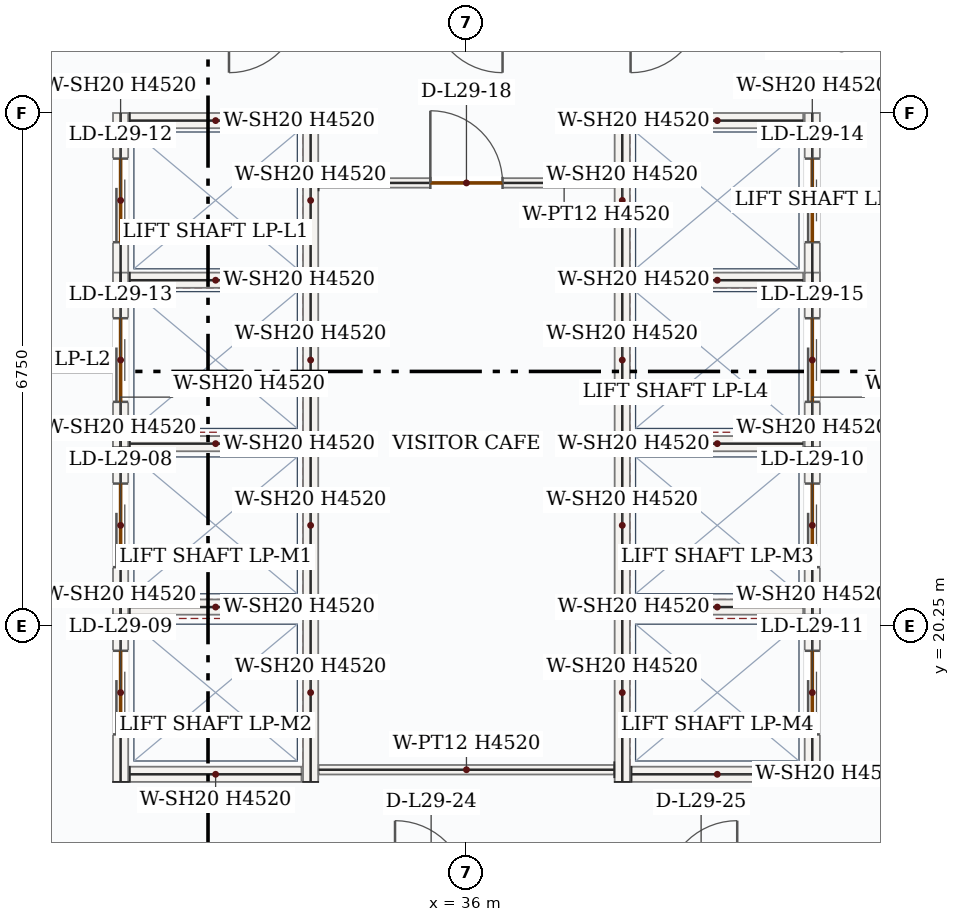
"""IFC4 building model, lengths in metres.
Left out: names, types, materials, properties, quantities, classifications, styles, units other than length and angle.
Written with IfcOpenShell. Run it as: python <this file> out.ifc"""

import sys

from ifc_helpers import new_model, si_unit, direction, frame, frame_2d, origin, place, context, subcontext, project, spatial, rectangle, extrude, source, transform, mapped, element, fill, save


model = new_model("IFC4")
c1 = context("Model", 3, precision=1e-05, world=origin(), true_north=direction((0.0, 1.0)))
c2 = subcontext(c1, "Body", "Model", "MODEL_VIEW")
j1 = project(units=[si_unit("LENGTHUNIT", "METRE"), si_unit("PLANEANGLEUNIT", "RADIAN")], contexts=[c1])
p1 = place(None, origin())
s1 = spatial("IfcSite", under=j1, at=p1, CompositionType="ELEMENT")
p2 = place(p1, origin())
s2 = spatial("IfcBuilding", under=s1, at=p2, CompositionType="ELEMENT")
p3 = place(p2, frame((0.0, 0.0, 130.8)))
s3 = spatial("IfcBuildingStorey", under=s2, at=p3, CompositionType="ELEMENT", Elevation=130.8)
p4 = place(p3, frame((31.45, 20.4, 0.0), z_axis=(0.0, 0.0, 1.0), x_axis=(0.0, 1.0, 0.0)))
e1 = element("IfcWall", 1, at=p4, inside=s3, PredefinedType="SOLIDWALL", context=c2, shape_type="SweptSolid", body=[
    extrude(rectangle(XDim=2.35, YDim=0.2, at=frame_2d((1.175, 0.0))), origin(), (0.0, 0.0, 1.0), 4.52),
])
p5 = place(p4, frame((0.625, 0.0, 0.0)))
e2 = element("IfcOpeningElement", 2, at=p5, cuts=e1, PredefinedType="OPENING", context=c2, shape_type="SweptSolid", body=[
    extrude(rectangle(XDim=1.1, YDim=2.15, at=frame_2d((0.55, 1.075))), frame((0.0, 0.11, 0.0), z_axis=(0.0, -1.0, 0.0), x_axis=(1.0, 0.0, 0.0)), (0.0, 0.0, 1.0), 0.22),
])
m1 = source(origin(), c2, "Body", "SweptSolid", [
    extrude(rectangle(XDim=2.35, YDim=0.2, at=frame_2d((1.175, 0.0))), origin(), (0.0, 0.0, 1.0), 4.52),
])
p6 = place(p3, frame((33.95, 20.4, 0.0), z_axis=(0.0, 0.0, 1.0), x_axis=(0.0, 1.0, 0.0)))
e3 = element("IfcWall", 3, at=p6, inside=s3, PredefinedType="SOLIDWALL", context=c2, shape_type="MappedRepresentation", body=[
    mapped(m1, transform((0.0, 0.0, 0.0), x_axis=(1.0, 0.0, 0.0), y_axis=(0.0, 1.0, 0.0), z_axis=(0.0, 0.0, 1.0), scale=1.0)),
])
m2 = source(origin(), c2, "Body", "SweptSolid", [
    extrude(rectangle(XDim=2.26, YDim=0.2, at=frame_2d((1.13, 0.0))), origin(), (0.0, 0.0, 1.0), 4.52),
])
for number, where, z_axis, x_axis in (
    (4, (31.57, 20.5, 0.0), (0.0, 0.0, 1.0), (1.0, 0.0, 0.0)),
    (5, (31.57, 22.65, 0.0), (0.0, 0.0, 1.0), (1.0, 0.0, 0.0)),
):
    element("IfcWall", number, at=place(p3, frame(where, z_axis=z_axis, x_axis=x_axis)), inside=s3, PredefinedType="SOLIDWALL", context=c2, shape_type="MappedRepresentation", body=[
        mapped(m2, transform((0.0, 0.0, 0.0), x_axis=(1.0, 0.0, 0.0), y_axis=(0.0, 1.0, 0.0), z_axis=(0.0, 0.0, 1.0), scale=1.0)),
    ])
p7 = place(p3, frame((31.45, 18.2, 0.0), z_axis=(0.0, 0.0, 1.0), x_axis=(0.0, 1.0, 0.0)))
e6 = element("IfcWall", 6, at=p7, inside=s3, PredefinedType="SOLIDWALL", context=c2, shape_type="SweptSolid", body=[
    extrude(rectangle(XDim=2.35, YDim=0.2, at=frame_2d((1.175, 0.0))), origin(), (0.0, 0.0, 1.0), 4.52),
])
p8 = place(p7, frame((0.625, 0.0, 0.0)))
e7 = element("IfcOpeningElement", 7, at=p8, cuts=e6, PredefinedType="OPENING", context=c2, shape_type="SweptSolid", body=[
    extrude(rectangle(XDim=1.1, YDim=2.15, at=frame_2d((0.55, 1.075))), frame((0.0, 0.11, 0.0), z_axis=(0.0, -1.0, 0.0), x_axis=(1.0, 0.0, 0.0)), (0.0, 0.0, 1.0), 0.22),
])
p9 = place(p3, frame((33.95, 18.2, 0.0), z_axis=(0.0, 0.0, 1.0), x_axis=(0.0, 1.0, 0.0)))
e8 = element("IfcWall", 8, at=p9, inside=s3, PredefinedType="SOLIDWALL", context=c2, shape_type="MappedRepresentation", body=[
    mapped(m1, transform((0.0, 0.0, 0.0), x_axis=(1.0, 0.0, 0.0), y_axis=(0.0, 1.0, 0.0), z_axis=(0.0, 0.0, 1.0), scale=1.0)),
])
p10 = place(p3, frame((31.57, 18.3, 0.0), z_axis=(0.0, 0.0, 1.0), x_axis=(1.0, 0.0, 0.0)))
e9 = element("IfcWall", 9, at=p10, inside=s3, PredefinedType="SOLIDWALL", context=c2, shape_type="MappedRepresentation", body=[
    mapped(m2, transform((0.0, 0.0, 0.0), x_axis=(1.0, 0.0, 0.0), y_axis=(0.0, 1.0, 0.0), z_axis=(0.0, 0.0, 1.0), scale=1.0)),
])
p11 = place(p3, frame((38.05, 20.4, 0.0), z_axis=(0.0, 0.0, 1.0), x_axis=(0.0, 1.0, 0.0)))
e10 = element("IfcWall", 10, at=p11, inside=s3, PredefinedType="SOLIDWALL", context=c2, shape_type="MappedRepresentation", body=[
    mapped(m1, transform((0.0, 0.0, 0.0), x_axis=(1.0, 0.0, 0.0), y_axis=(0.0, 1.0, 0.0), z_axis=(0.0, 0.0, 1.0), scale=1.0)),
])
p12 = place(p3, frame((40.55, 20.4, 0.0), z_axis=(0.0, 0.0, 1.0), x_axis=(0.0, 1.0, 0.0)))
e11 = element("IfcWall", 11, at=p12, inside=s3, PredefinedType="SOLIDWALL", context=c2, shape_type="SweptSolid", body=[
    extrude(rectangle(XDim=2.35, YDim=0.2, at=frame_2d((1.175, 0.0))), origin(), (0.0, 0.0, 1.0), 4.52),
])
p13 = place(p12, frame((0.625, 0.0, 0.0)))
e12 = element("IfcOpeningElement", 12, at=p13, cuts=e11, PredefinedType="OPENING", context=c2, shape_type="SweptSolid", body=[
    extrude(rectangle(XDim=1.1, YDim=2.15, at=frame_2d((0.55, 1.075))), frame((0.0, 0.11, 0.0), z_axis=(0.0, -1.0, 0.0), x_axis=(1.0, 0.0, 0.0)), (0.0, 0.0, 1.0), 0.22),
])
for number, where, z_axis, x_axis in (
    (13, (38.17, 20.5, 0.0), (0.0, 0.0, 1.0), (1.0, 0.0, 0.0)),
    (14, (38.17, 22.65, 0.0), (0.0, 0.0, 1.0), (1.0, 0.0, 0.0)),
):
    element("IfcWall", number, at=place(p3, frame(where, z_axis=z_axis, x_axis=x_axis)), inside=s3, PredefinedType="SOLIDWALL", context=c2, shape_type="MappedRepresentation", body=[
        mapped(m2, transform((0.0, 0.0, 0.0), x_axis=(1.0, 0.0, 0.0), y_axis=(0.0, 1.0, 0.0), z_axis=(0.0, 0.0, 1.0), scale=1.0)),
    ])
p14 = place(p3, frame((38.05, 18.2, 0.0), z_axis=(0.0, 0.0, 1.0), x_axis=(0.0, 1.0, 0.0)))
e15 = element("IfcWall", 15, at=p14, inside=s3, PredefinedType="SOLIDWALL", context=c2, shape_type="MappedRepresentation", body=[
    mapped(m1, transform((0.0, 0.0, 0.0), x_axis=(1.0, 0.0, 0.0), y_axis=(0.0, 1.0, 0.0), z_axis=(0.0, 0.0, 1.0), scale=1.0)),
])
p15 = place(p3, frame((40.55, 18.2, 0.0), z_axis=(0.0, 0.0, 1.0), x_axis=(0.0, 1.0, 0.0)))
e16 = element("IfcWall", 16, at=p15, inside=s3, PredefinedType="SOLIDWALL", context=c2, shape_type="SweptSolid", body=[
    extrude(rectangle(XDim=2.35, YDim=0.2, at=frame_2d((1.175, 0.0))), origin(), (0.0, 0.0, 1.0), 4.52),
])
p16 = place(p15, frame((0.625, 0.0, 0.0)))
e17 = element("IfcOpeningElement", 17, at=p16, cuts=e16, PredefinedType="OPENING", context=c2, shape_type="SweptSolid", body=[
    extrude(rectangle(XDim=1.1, YDim=2.15, at=frame_2d((0.55, 1.075))), frame((0.0, 0.11, 0.0), z_axis=(0.0, -1.0, 0.0), x_axis=(1.0, 0.0, 0.0)), (0.0, 0.0, 1.0), 0.22),
])
p17 = place(p3, frame((38.17, 18.3, 0.0), z_axis=(0.0, 0.0, 1.0), x_axis=(1.0, 0.0, 0.0)))
e18 = element("IfcWall", 18, at=p17, inside=s3, PredefinedType="SOLIDWALL", context=c2, shape_type="MappedRepresentation", body=[
    mapped(m2, transform((0.0, 0.0, 0.0), x_axis=(1.0, 0.0, 0.0), y_axis=(0.0, 1.0, 0.0), z_axis=(0.0, 0.0, 1.0), scale=1.0)),
])
p18 = place(p3, frame((31.45, 24.7, 0.0), z_axis=(0.0, 0.0, 1.0), x_axis=(0.0, 1.0, 0.0)))
e19 = element("IfcWall", 19, at=p18, inside=s3, PredefinedType="SOLIDWALL", context=c2, shape_type="SweptSolid", body=[
    extrude(rectangle(XDim=2.3, YDim=0.2, at=frame_2d((1.15, 0.0))), origin(), (0.0, 0.0, 1.0), 4.52),
])
p19 = place(p18, frame((0.6, 0.0, 0.0)))
e20 = element("IfcOpeningElement", 20, at=p19, cuts=e19, PredefinedType="OPENING", context=c2, shape_type="SweptSolid", body=[
    extrude(rectangle(XDim=1.1, YDim=2.15, at=frame_2d((0.55, 1.075))), frame((0.0, 0.11, 0.0), z_axis=(0.0, -1.0, 0.0), x_axis=(1.0, 0.0, 0.0)), (0.0, 0.0, 1.0), 0.22),
])
m3 = source(origin(), c2, "Body", "SweptSolid", [
    extrude(rectangle(XDim=2.3, YDim=0.2, at=frame_2d((1.15, 0.0))), origin(), (0.0, 0.0, 1.0), 4.52),
])
p20 = place(p3, frame((33.95, 24.7, 0.0), z_axis=(0.0, 0.0, 1.0), x_axis=(0.0, 1.0, 0.0)))
e21 = element("IfcWall", 21, at=p20, inside=s3, PredefinedType="SOLIDWALL", context=c2, shape_type="MappedRepresentation", body=[
    mapped(m3, transform((0.0, 0.0, 0.0), x_axis=(1.0, 0.0, 0.0), y_axis=(0.0, 1.0, 0.0), z_axis=(0.0, 0.0, 1.0), scale=1.0)),
])
for number, where, z_axis, x_axis in (
    (22, (31.57, 24.8, 0.0), (0.0, 0.0, 1.0), (1.0, 0.0, 0.0)),
    (23, (31.57, 26.9, 0.0), (0.0, 0.0, 1.0), (1.0, 0.0, 0.0)),
):
    element("IfcWall", number, at=place(p3, frame(where, z_axis=z_axis, x_axis=x_axis)), inside=s3, PredefinedType="SOLIDWALL", context=c2, shape_type="MappedRepresentation", body=[
        mapped(m2, transform((0.0, 0.0, 0.0), x_axis=(1.0, 0.0, 0.0), y_axis=(0.0, 1.0, 0.0), z_axis=(0.0, 0.0, 1.0), scale=1.0)),
    ])
p21 = place(p3, frame((31.45, 22.6, 0.0), z_axis=(0.0, 0.0, 1.0), x_axis=(0.0, 1.0, 0.0)))
e24 = element("IfcWall", 24, at=p21, inside=s3, PredefinedType="SOLIDWALL", context=c2, shape_type="SweptSolid", body=[
    extrude(rectangle(XDim=2.3, YDim=0.2, at=frame_2d((1.15, 0.0))), origin(), (0.0, 0.0, 1.0), 4.52),
])
p22 = place(p21, frame((0.6, 0.0, 0.0)))
e25 = element("IfcOpeningElement", 25, at=p22, cuts=e24, PredefinedType="OPENING", context=c2, shape_type="SweptSolid", body=[
    extrude(rectangle(XDim=1.1, YDim=2.15, at=frame_2d((0.55, 1.075))), frame((0.0, 0.11, 0.0), z_axis=(0.0, -1.0, 0.0), x_axis=(1.0, 0.0, 0.0)), (0.0, 0.0, 1.0), 0.22),
])
m4 = source(origin(), c2, "Body", "SweptSolid", [
    extrude(rectangle(XDim=2.3, YDim=0.2, at=frame_2d((1.15, 0.0))), origin(), (0.0, 0.0, 1.0), 4.52),
])
p23 = place(p3, frame((33.95, 22.6, 0.0), z_axis=(0.0, 0.0, 1.0), x_axis=(0.0, 1.0, 0.0)))
e26 = element("IfcWall", 26, at=p23, inside=s3, PredefinedType="SOLIDWALL", context=c2, shape_type="MappedRepresentation", body=[
    mapped(m4, transform((0.0, 0.0, 0.0), x_axis=(1.0, 0.0, 0.0), y_axis=(0.0, 1.0, 0.0), z_axis=(0.0, 0.0, 1.0), scale=1.0)),
])
p24 = place(p3, frame((38.05, 24.7, 0.0), z_axis=(0.0, 0.0, 1.0), x_axis=(0.0, 1.0, 0.0)))
e27 = element("IfcWall", 27, at=p24, inside=s3, PredefinedType="SOLIDWALL", context=c2, shape_type="MappedRepresentation", body=[
    mapped(m3, transform((0.0, 0.0, 0.0), x_axis=(1.0, 0.0, 0.0), y_axis=(0.0, 1.0, 0.0), z_axis=(0.0, 0.0, 1.0), scale=1.0)),
])
p25 = place(p3, frame((40.55, 24.7, 0.0), z_axis=(0.0, 0.0, 1.0), x_axis=(0.0, 1.0, 0.0)))
e28 = element("IfcWall", 28, at=p25, inside=s3, PredefinedType="SOLIDWALL", context=c2, shape_type="SweptSolid", body=[
    extrude(rectangle(XDim=2.3, YDim=0.2, at=frame_2d((1.15, 0.0))), origin(), (0.0, 0.0, 1.0), 4.52),
])
p26 = place(p25, frame((0.6, 0.0, 0.0)))
e29 = element("IfcOpeningElement", 29, at=p26, cuts=e28, PredefinedType="OPENING", context=c2, shape_type="SweptSolid", body=[
    extrude(rectangle(XDim=1.1, YDim=2.15, at=frame_2d((0.55, 1.075))), frame((0.0, 0.11, 0.0), z_axis=(0.0, -1.0, 0.0), x_axis=(1.0, 0.0, 0.0)), (0.0, 0.0, 1.0), 0.22),
])
for number, where, z_axis, x_axis in (
    (30, (38.17, 24.8, 0.0), (0.0, 0.0, 1.0), (1.0, 0.0, 0.0)),
    (31, (38.17, 26.9, 0.0), (0.0, 0.0, 1.0), (1.0, 0.0, 0.0)),
):
    element("IfcWall", number, at=place(p3, frame(where, z_axis=z_axis, x_axis=x_axis)), inside=s3, PredefinedType="SOLIDWALL", context=c2, shape_type="MappedRepresentation", body=[
        mapped(m2, transform((0.0, 0.0, 0.0), x_axis=(1.0, 0.0, 0.0), y_axis=(0.0, 1.0, 0.0), z_axis=(0.0, 0.0, 1.0), scale=1.0)),
    ])
p27 = place(p3, frame((38.05, 22.6, 0.0), z_axis=(0.0, 0.0, 1.0), x_axis=(0.0, 1.0, 0.0)))
e32 = element("IfcWall", 32, at=p27, inside=s3, PredefinedType="SOLIDWALL", context=c2, shape_type="MappedRepresentation", body=[
    mapped(m4, transform((0.0, 0.0, 0.0), x_axis=(1.0, 0.0, 0.0), y_axis=(0.0, 1.0, 0.0), z_axis=(0.0, 0.0, 1.0), scale=1.0)),
])
p28 = place(p3, frame((40.55, 22.6, 0.0), z_axis=(0.0, 0.0, 1.0), x_axis=(0.0, 1.0, 0.0)))
e33 = element("IfcWall", 33, at=p28, inside=s3, PredefinedType="SOLIDWALL", context=c2, shape_type="SweptSolid", body=[
    extrude(rectangle(XDim=2.3, YDim=0.2, at=frame_2d((1.15, 0.0))), origin(), (0.0, 0.0, 1.0), 4.52),
])
p29 = place(p28, frame((0.6, 0.0, 0.0)))
e34 = element("IfcOpeningElement", 34, at=p29, cuts=e33, PredefinedType="OPENING", context=c2, shape_type="SweptSolid", body=[
    extrude(rectangle(XDim=1.1, YDim=2.15, at=frame_2d((0.55, 1.075))), frame((0.0, 0.11, 0.0), z_axis=(0.0, -1.0, 0.0), x_axis=(1.0, 0.0, 0.0)), (0.0, 0.0, 1.0), 0.22),
])
m5 = source(origin(), c2, "Body", "SweptSolid", [
    extrude(rectangle(XDim=3.89, YDim=0.125, at=frame_2d((1.945, 0.0))), origin(), (0.0, 0.0, 1.0), 4.52),
])
p30 = place(p3, frame((37.945, 18.36, 0.0), z_axis=(0.0, 0.0, 1.0), x_axis=(-1.0, 0.0, 0.0)))
e35 = element("IfcWall", 35, at=p30, inside=s3, PredefinedType="PARTITIONING", context=c2, shape_type="MappedRepresentation", body=[
    mapped(m5, transform((0.0, 0.0, 0.0), x_axis=(1.0, 0.0, 0.0), y_axis=(0.0, 1.0, 0.0), z_axis=(0.0, 0.0, 1.0), scale=1.0)),
])
p31 = place(p3, frame((34.055, 26.08, 0.0), z_axis=(0.0, 0.0, 1.0), x_axis=(1.0, 0.0, 0.0)))
e36 = element("IfcWall", 36, at=p31, inside=s3, PredefinedType="PARTITIONING", context=c2, shape_type="SweptSolid", body=[
    extrude(rectangle(XDim=3.89, YDim=0.125, at=frame_2d((1.945, 0.0))), origin(), (0.0, 0.0, 1.0), 4.52),
])
p32 = place(p31, frame((1.47, 0.0, 0.0)))
e37 = element("IfcOpeningElement", 37, at=p32, cuts=e36, PredefinedType="OPENING", context=c2, shape_type="SweptSolid", body=[
    extrude(rectangle(XDim=0.95, YDim=2.15, at=frame_2d((0.475, 1.075))), frame((0.0, 0.073, 0.0), z_axis=(0.0, -1.0, 0.0), x_axis=(1.0, 0.0, 0.0)), (0.0, 0.0, 1.0), 0.145),
])
m6 = source(origin(), c2, "Body", "SweptSolid", [
    extrude(rectangle(XDim=1.1, YDim=2.15, at=frame_2d((0.55, 1.075))), frame((0.0, 0.025, 0.0), z_axis=(0.0, -1.0, 0.0), x_axis=(1.0, 0.0, 0.0)), (0.0, 0.0, 1.0), 0.05),
])
p33 = place(p5, origin())
e38 = element("IfcDoor", 38, at=p33, inside=s3, OperationType="DOUBLE_DOOR_SLIDING", PredefinedType="DOOR", context=c2, shape_type="MappedRepresentation", body=[
    mapped(m6, transform((0.0, 0.0, 0.0), x_axis=(1.0, 0.0, 0.0), y_axis=(0.0, 1.0, 0.0), z_axis=(0.0, 0.0, 1.0), scale=1.0)),
])
fill(e2, e38)
p34 = place(p8, origin())
e39 = element("IfcDoor", 39, at=p34, inside=s3, OperationType="DOUBLE_DOOR_SLIDING", PredefinedType="DOOR", context=c2, shape_type="MappedRepresentation", body=[
    mapped(m6, transform((0.0, 0.0, 0.0), x_axis=(1.0, 0.0, 0.0), y_axis=(0.0, 1.0, 0.0), z_axis=(0.0, 0.0, 1.0), scale=1.0)),
])
fill(e7, e39)
p35 = place(p13, origin())
e40 = element("IfcDoor", 40, at=p35, inside=s3, OperationType="DOUBLE_DOOR_SLIDING", PredefinedType="DOOR", context=c2, shape_type="MappedRepresentation", body=[
    mapped(m6, transform((0.0, 0.0, 0.0), x_axis=(1.0, 0.0, 0.0), y_axis=(0.0, 1.0, 0.0), z_axis=(0.0, 0.0, 1.0), scale=1.0)),
])
fill(e12, e40)
p36 = place(p16, origin())
e41 = element("IfcDoor", 41, at=p36, inside=s3, OperationType="DOUBLE_DOOR_SLIDING", PredefinedType="DOOR", context=c2, shape_type="MappedRepresentation", body=[
    mapped(m6, transform((0.0, 0.0, 0.0), x_axis=(1.0, 0.0, 0.0), y_axis=(0.0, 1.0, 0.0), z_axis=(0.0, 0.0, 1.0), scale=1.0)),
])
fill(e17, e41)
p37 = place(p19, origin())
e42 = element("IfcDoor", 42, at=p37, inside=s3, OperationType="DOUBLE_DOOR_SLIDING", PredefinedType="DOOR", context=c2, shape_type="MappedRepresentation", body=[
    mapped(m6, transform((0.0, 0.0, 0.0), x_axis=(1.0, 0.0, 0.0), y_axis=(0.0, 1.0, 0.0), z_axis=(0.0, 0.0, 1.0), scale=1.0)),
])
fill(e20, e42)
p38 = place(p22, origin())
e43 = element("IfcDoor", 43, at=p38, inside=s3, OperationType="DOUBLE_DOOR_SLIDING", PredefinedType="DOOR", context=c2, shape_type="MappedRepresentation", body=[
    mapped(m6, transform((0.0, 0.0, 0.0), x_axis=(1.0, 0.0, 0.0), y_axis=(0.0, 1.0, 0.0), z_axis=(0.0, 0.0, 1.0), scale=1.0)),
])
fill(e25, e43)
p39 = place(p26, origin())
e44 = element("IfcDoor", 44, at=p39, inside=s3, OperationType="DOUBLE_DOOR_SLIDING", PredefinedType="DOOR", context=c2, shape_type="MappedRepresentation", body=[
    mapped(m6, transform((0.0, 0.0, 0.0), x_axis=(1.0, 0.0, 0.0), y_axis=(0.0, 1.0, 0.0), z_axis=(0.0, 0.0, 1.0), scale=1.0)),
])
fill(e29, e44)
p40 = place(p29, origin())
e45 = element("IfcDoor", 45, at=p40, inside=s3, OperationType="DOUBLE_DOOR_SLIDING", PredefinedType="DOOR", context=c2, shape_type="MappedRepresentation", body=[
    mapped(m6, transform((0.0, 0.0, 0.0), x_axis=(1.0, 0.0, 0.0), y_axis=(0.0, 1.0, 0.0), z_axis=(0.0, 0.0, 1.0), scale=1.0)),
])
fill(e34, e45)
m7 = source(origin(), c2, "Body", "SweptSolid", [
    extrude(rectangle(XDim=0.95, YDim=2.15, at=frame_2d((0.475, 1.075))), frame((0.0, 0.025, 0.0), z_axis=(0.0, -1.0, 0.0), x_axis=(1.0, 0.0, 0.0)), (0.0, 0.0, 1.0), 0.05),
])
p41 = place(p32, origin())
e46 = element("IfcDoor", 46, at=p41, inside=s3, OperationType="SINGLE_SWING_LEFT", PredefinedType="DOOR", context=c2, shape_type="MappedRepresentation", body=[
    mapped(m7, transform((0.0, 0.0, 0.0), x_axis=(1.0, 0.0, 0.0), y_axis=(0.0, 1.0, 0.0), z_axis=(0.0, 0.0, 1.0), scale=1.0)),
])
fill(e37, e46)
save(model, sys.argv[1])
